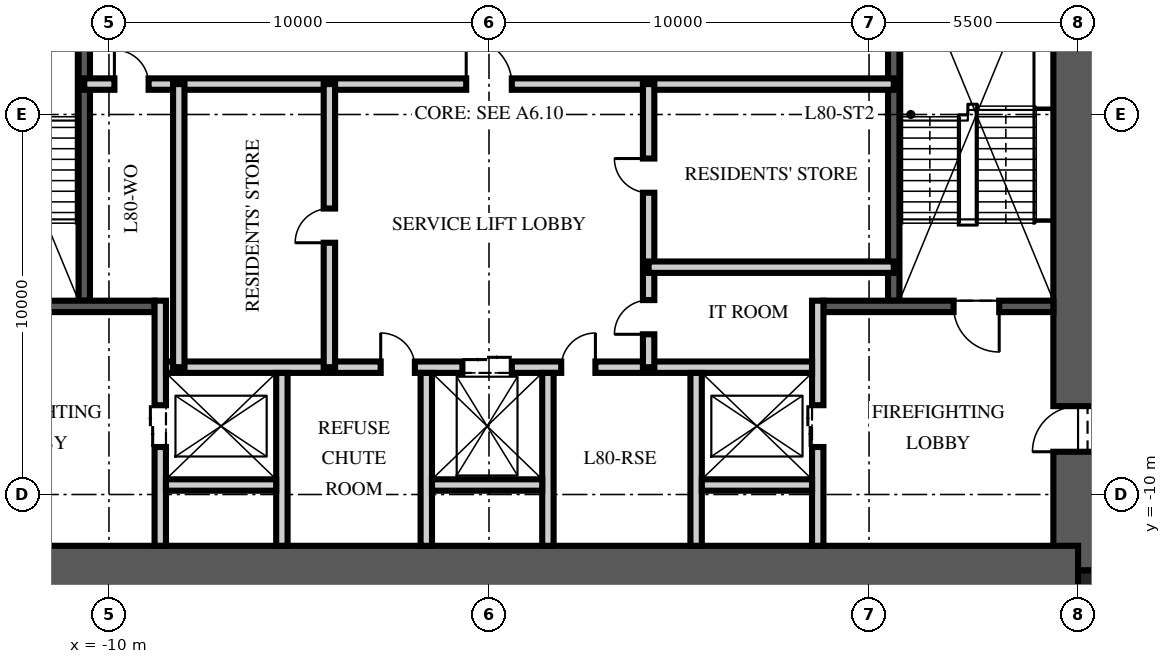
"""IFC4 building model, lengths in metres.
Left out: names, types, materials, properties, quantities, classifications, styles, units other than length and angle.
Written with IfcOpenShell. Run it as: python <this file> out.ifc"""

import sys

from ifc_helpers import new_model, si_unit, direction, frame, frame_2d, origin, origin_2d, place, context, subcontext, project, spatial, rectangle, extrude, element, fill, save


model = new_model("IFC4")
c1 = context("Model", 3, precision=1e-05, world=origin(), true_north=direction((0.0, 1.0)))
c2 = subcontext(c1, "Body", "Model", "MODEL_VIEW")
j1 = project(units=[si_unit("LENGTHUNIT", "METRE"), si_unit("PLANEANGLEUNIT", "RADIAN")], contexts=[c1])
p1 = place(None, origin())
s1 = spatial("IfcSite", under=j1, at=p1, CompositionType="ELEMENT")
p2 = place(p1, origin())
s2 = spatial("IfcBuilding", under=s1, at=p2, CompositionType="ELEMENT")
p3 = place(p2, frame((0.0, 0.0, 319.5)))
s3 = spatial("IfcBuildingStorey", under=s2, at=p3, CompositionType="ELEMENT", Elevation=319.5)
p4 = place(p3, frame((15.5, -12.0, -0.25), z_axis=(0.0, 0.0, 1.0), x_axis=(0.0, 1.0, 0.0)))
e1 = element("IfcWall", 1, at=p4, inside=s3, PredefinedType="SHEAR", context=c2, shape_type="SweptSolid", body=[
    extrude(rectangle(XDim=24.0, YDim=1.3, at=frame_2d((12.0, 0.0))), origin(), (0.0, 0.0, 1.0), 3.75),
])
p5 = place(p4, frame((3.125, 0.0, 0.25)))
e2 = element("IfcOpeningElement", 2, at=p5, cuts=e1, PredefinedType="OPENING", context=c2, shape_type="SweptSolid", body=[
    extrude(rectangle(XDim=1.2, YDim=2.1, at=frame_2d((0.6, 1.05))), frame((0.0, 0.66, 0.0), z_axis=(0.0, -1.0, 0.0), x_axis=(1.0, 0.0, 0.0)), (0.0, 0.0, 1.0), 1.32),
])
p6 = place(p4, frame((19.375, 0.0, 0.25)))
e3 = element("IfcOpeningElement", 3, at=p6, cuts=e1, PredefinedType="OPENING", context=c2, shape_type="SweptSolid", body=[
    extrude(rectangle(XDim=1.8, YDim=2.1, at=frame_2d((0.9, 1.05))), frame((0.0, 0.66, 0.0), z_axis=(0.0, -1.0, 0.0), x_axis=(1.0, 0.0, 0.0)), (0.0, 0.0, 1.0), 1.32),
])
p7 = place(p3, frame((-15.5, -12.0, -0.25), z_axis=(0.0, 0.0, 1.0), x_axis=(1.0, 0.0, 0.0)))
e4 = element("IfcWall", 4, at=p7, inside=s3, PredefinedType="SHEAR", context=c2, shape_type="SweptSolid", body=[
    extrude(rectangle(XDim=31.0, YDim=1.3, at=frame_2d((15.5, 0.0))), origin(), (0.0, 0.0, 1.0), 3.75),
])
p8 = place(p3, frame((15.825, -12.325, -0.25), z_axis=(0.0, 0.0, 1.0), x_axis=(1.0, 0.0, 0.0)))
e5 = element("IfcColumn", 5, at=p8, inside=s3, PredefinedType="COLUMN", context=c2, shape_type="SweptSolid", body=[
    extrude(rectangle(XDim=0.65, YDim=0.65, at=origin_2d()), origin(), (0.0, 0.0, 1.0), 3.75),
])
p9 = place(p3, frame((-10.65, -4.9, 0.0), z_axis=(0.0, 0.0, 1.0), x_axis=(0.0, 1.0, 0.0)))
e6 = element("IfcWall", 6, at=p9, inside=s3, PredefinedType="SOLIDWALL", context=c2, shape_type="SweptSolid", body=[
    extrude(rectangle(XDim=10.1, YDim=0.3, at=frame_2d((5.05, 0.0))), origin(), (0.0, 0.0, 1.0), 3.5),
])
p10 = place(p3, frame((-14.85, -5.05, 0.0), z_axis=(0.0, 0.0, 1.0), x_axis=(1.0, 0.0, 0.0)))
e7 = element("IfcWall", 7, at=p10, inside=s3, PredefinedType="SOLIDWALL", context=c2, shape_type="SweptSolid", body=[
    extrude(rectangle(XDim=6.05, YDim=0.3, at=frame_2d((3.025, 0.0))), origin(), (0.0, 0.0, 1.0), 3.5),
])
p11 = place(p10, frame((1.425, 0.0, 0.0)))
e8 = element("IfcOpeningElement", 8, at=p11, cuts=e7, PredefinedType="OPENING", context=c2, shape_type="SweptSolid", body=[
    extrude(rectangle(XDim=1.2, YDim=2.1, at=frame_2d((0.6, 1.05))), frame((0.0, 0.16, 0.0), z_axis=(0.0, -1.0, 0.0), x_axis=(1.0, 0.0, 0.0)), (0.0, 0.0, 1.0), 0.32),
])
p12 = place(p3, frame((-8.65, -11.35, 0.0), z_axis=(0.0, 0.0, 1.0), x_axis=(0.0, 1.0, 0.0)))
e9 = element("IfcWall", 9, at=p12, inside=s3, PredefinedType="PARTITIONING", context=c2, shape_type="SweptSolid", body=[
    extrude(rectangle(XDim=6.45, YDim=0.3, at=frame_2d((3.225, 0.0))), origin(), (0.0, 0.0, 1.0), 3.5),
])
p13 = place(p12, frame((2.6, 0.0, 0.0)))
e10 = element("IfcOpeningElement", 10, at=p13, cuts=e9, PredefinedType="OPENING", context=c2, shape_type="SweptSolid", body=[
    extrude(rectangle(XDim=1.1, YDim=2.1, at=frame_2d((0.55, 1.05))), frame((0.0, 0.16, 0.0), z_axis=(0.0, -1.0, 0.0), x_axis=(1.0, 0.0, 0.0)), (0.0, 0.0, 1.0), 0.32),
])
p14 = place(p3, frame((10.65, -4.9, 0.0), z_axis=(0.0, 0.0, 1.0), x_axis=(0.0, 1.0, 0.0)))
e11 = element("IfcWall", 11, at=p14, inside=s3, PredefinedType="SOLIDWALL", context=c2, shape_type="SweptSolid", body=[
    extrude(rectangle(XDim=10.1, YDim=0.3, at=frame_2d((5.05, 0.0))), origin(), (0.0, 0.0, 1.0), 3.5),
])
p15 = place(p3, frame((14.85, -5.05, 0.0), z_axis=(0.0, 0.0, 1.0), x_axis=(-1.0, 0.0, 0.0)))
e12 = element("IfcWall", 12, at=p15, inside=s3, PredefinedType="SOLIDWALL", context=c2, shape_type="SweptSolid", body=[
    extrude(rectangle(XDim=6.05, YDim=0.3, at=frame_2d((3.025, 0.0))), origin(), (0.0, 0.0, 1.0), 3.5),
])
p16 = place(p15, frame((1.425, 0.0, 0.0)))
e13 = element("IfcOpeningElement", 13, at=p16, cuts=e12, PredefinedType="OPENING", context=c2, shape_type="SweptSolid", body=[
    extrude(rectangle(XDim=1.2, YDim=2.1, at=frame_2d((0.6, 1.05))), frame((0.0, 0.16, 0.0), z_axis=(0.0, -1.0, 0.0), x_axis=(1.0, 0.0, 0.0)), (0.0, 0.0, 1.0), 0.32),
])
p17 = place(p3, frame((8.65, -11.35, 0.0), z_axis=(0.0, 0.0, 1.0), x_axis=(0.0, 1.0, 0.0)))
e14 = element("IfcWall", 14, at=p17, inside=s3, PredefinedType="PARTITIONING", context=c2, shape_type="SweptSolid", body=[
    extrude(rectangle(XDim=6.45, YDim=0.3, at=frame_2d((3.225, 0.0))), origin(), (0.0, 0.0, 1.0), 3.5),
])
p18 = place(p17, frame((2.6, 0.0, 0.0)))
e15 = element("IfcOpeningElement", 15, at=p18, cuts=e14, PredefinedType="OPENING", context=c2, shape_type="SweptSolid", body=[
    extrude(rectangle(XDim=1.1, YDim=2.1, at=frame_2d((0.55, 1.05))), frame((0.0, 0.16, 0.0), z_axis=(0.0, -1.0, 0.0), x_axis=(1.0, 0.0, 0.0)), (0.0, 0.0, 1.0), 0.32),
])
p19 = place(p3, frame((-8.5, -6.65, 0.0), z_axis=(0.0, 0.0, 1.0), x_axis=(1.0, 0.0, 0.0)))
e16 = element("IfcWall", 16, at=p19, inside=s3, PredefinedType="PARTITIONING", context=c2, shape_type="SweptSolid", body=[
    extrude(rectangle(XDim=17.0, YDim=0.3, at=frame_2d((8.5, 0.0))), origin(), (0.0, 0.0, 1.0), 3.5),
])
p20 = place(p19, frame((7.8, 0.0, 0.0)))
e17 = element("IfcOpeningElement", 17, at=p20, cuts=e16, PredefinedType="OPENING", context=c2, shape_type="SweptSolid", body=[
    extrude(rectangle(XDim=1.3, YDim=2.4, at=frame_2d((0.65, 1.2))), frame((0.0, 0.16, 0.0), z_axis=(0.0, -1.0, 0.0), x_axis=(1.0, 0.0, 0.0)), (0.0, 0.0, 1.0), 0.32),
])
p21 = place(p19, frame((5.65, 0.0, 0.0)))
e18 = element("IfcOpeningElement", 18, at=p21, cuts=e16, PredefinedType="OPENING", context=c2, shape_type="SweptSolid", body=[
    extrude(rectangle(XDim=0.9, YDim=2.1, at=frame_2d((0.45, 1.05))), frame((0.0, 0.16, 0.0), z_axis=(0.0, -1.0, 0.0), x_axis=(1.0, 0.0, 0.0)), (0.0, 0.0, 1.0), 0.32),
])
p22 = place(p19, frame((10.4, 0.0, 0.0)))
e19 = element("IfcOpeningElement", 19, at=p22, cuts=e16, PredefinedType="OPENING", context=c2, shape_type="SweptSolid", body=[
    extrude(rectangle(XDim=0.9, YDim=2.1, at=frame_2d((0.45, 1.05))), frame((0.0, 0.16, 0.0), z_axis=(0.0, -1.0, 0.0), x_axis=(1.0, 0.0, 0.0)), (0.0, 0.0, 1.0), 0.32),
])
for number, where, z_axis, x_axis in (
    (20, (-5.45, -11.35, 0.0), (0.0, 0.0, 1.0), (0.0, 1.0, 0.0)),
    (21, (-1.65, -11.35, 0.0), (0.0, 0.0, 1.0), (0.0, 1.0, 0.0)),
    (22, (1.55, -11.35, 0.0), (0.0, 0.0, 1.0), (0.0, 1.0, 0.0)),
    (23, (5.45, -11.35, 0.0), (0.0, 0.0, 1.0), (0.0, 1.0, 0.0)),
):
    element("IfcWall", number, at=place(p3, frame(where, z_axis=z_axis, x_axis=x_axis)), inside=s3, PredefinedType="PARTITIONING", context=c2, shape_type="SweptSolid", body=[
        extrude(rectangle(XDim=4.55, YDim=0.3, at=frame_2d((2.275, 0.0))), origin(), (0.0, 0.0, 1.0), 3.5),
    ])
for number, where, z_axis, x_axis in (
    (24, (-8.5, -9.75, 0.0), (0.0, 0.0, 1.0), (1.0, 0.0, 0.0)),
    (25, (-1.5, -9.75, 0.0), (0.0, 0.0, 1.0), (1.0, 0.0, 0.0)),
    (26, (5.6, -9.75, 0.0), (0.0, 0.0, 1.0), (1.0, 0.0, 0.0)),
):
    element("IfcWall", number, at=place(p3, frame(where, z_axis=z_axis, x_axis=x_axis)), inside=s3, PredefinedType="PARTITIONING", context=c2, shape_type="SweptSolid", body=[
        extrude(rectangle(XDim=2.9, YDim=0.3, at=frame_2d((1.45, 0.0))), origin(), (0.0, 0.0, 1.0), 3.5),
    ])
p23 = place(p3, frame((-10.65, 0.8, 0.0), z_axis=(0.0, 0.0, 1.0), x_axis=(1.0, 0.0, 0.0)))
e27 = element("IfcWall", 27, at=p23, inside=s3, PredefinedType="PARTITIONING", context=c2, shape_type="SweptSolid", body=[
    extrude(rectangle(XDim=21.3, YDim=0.3, at=frame_2d((10.65, 0.0))), origin(), (0.0, 0.0, 1.0), 3.5),
])
p24 = place(p23, frame((10.05, 0.0, 0.0)))
e28 = element("IfcOpeningElement", 28, at=p24, cuts=e27, PredefinedType="OPENING", context=c2, shape_type="SweptSolid", body=[
    extrude(rectangle(XDim=1.2, YDim=2.1, at=frame_2d((0.6, 1.05))), frame((0.0, 0.16, 0.0), z_axis=(0.0, -1.0, 0.0), x_axis=(1.0, 0.0, 0.0)), (0.0, 0.0, 1.0), 0.32),
])
p25 = place(p23, frame((0.793, 0.0, 0.0)))
e29 = element("IfcOpeningElement", 29, at=p25, cuts=e27, PredefinedType="OPENING", context=c2, shape_type="SweptSolid", body=[
    extrude(rectangle(XDim=0.9, YDim=2.1, at=frame_2d((0.45, 1.05))), frame((0.0, 0.16, 0.0), z_axis=(0.0, -1.0, 0.0), x_axis=(1.0, 0.0, 0.0)), (0.0, 0.0, 1.0), 0.32),
])
p26 = place(p3, frame((-4.2, -6.65, 0.0), z_axis=(0.0, 0.0, 1.0), x_axis=(0.0, 1.0, 0.0)))
e30 = element("IfcWall", 30, at=p26, inside=s3, PredefinedType="PARTITIONING", context=c2, shape_type="SweptSolid", body=[
    extrude(rectangle(XDim=7.45, YDim=0.3, at=frame_2d((3.725, 0.0))), origin(), (0.0, 0.0, 1.0), 3.5),
])
p27 = place(p26, frame((3.275, 0.0, 0.0)))
e31 = element("IfcOpeningElement", 31, at=p27, cuts=e30, PredefinedType="OPENING", context=c2, shape_type="SweptSolid", body=[
    extrude(rectangle(XDim=0.9, YDim=2.1, at=frame_2d((0.45, 1.05))), frame((0.0, 0.16, 0.0), z_axis=(0.0, -1.0, 0.0), x_axis=(1.0, 0.0, 0.0)), (0.0, 0.0, 1.0), 0.32),
])
p28 = place(p3, frame((4.2, -6.65, 0.0), z_axis=(0.0, 0.0, 1.0), x_axis=(0.0, 1.0, 0.0)))
e32 = element("IfcWall", 32, at=p28, inside=s3, PredefinedType="PARTITIONING", context=c2, shape_type="SweptSolid", body=[
    extrude(rectangle(XDim=7.45, YDim=0.3, at=frame_2d((3.725, 0.0))), origin(), (0.0, 0.0, 1.0), 3.5),
])
p29 = place(p28, frame((0.866, 0.0, 0.0)))
e33 = element("IfcOpeningElement", 33, at=p29, cuts=e32, PredefinedType="OPENING", context=c2, shape_type="SweptSolid", body=[
    extrude(rectangle(XDim=0.9, YDim=2.1, at=frame_2d((0.45, 1.05))), frame((0.0, 0.16, 0.0), z_axis=(0.0, -1.0, 0.0), x_axis=(1.0, 0.0, 0.0)), (0.0, 0.0, 1.0), 0.32),
])
p30 = place(p28, frame((4.591, 0.0, 0.0)))
e34 = element("IfcOpeningElement", 34, at=p30, cuts=e32, PredefinedType="OPENING", context=c2, shape_type="SweptSolid", body=[
    extrude(rectangle(XDim=0.9, YDim=2.1, at=frame_2d((0.45, 1.05))), frame((0.0, 0.16, 0.0), z_axis=(0.0, -1.0, 0.0), x_axis=(1.0, 0.0, 0.0)), (0.0, 0.0, 1.0), 0.32),
])
p31 = place(p3, frame((-8.163, -6.65, 0.0), z_axis=(0.0, 0.0, 1.0), x_axis=(0.0, 1.0, 0.0)))
e35 = element("IfcWall", 35, at=p31, inside=s3, PredefinedType="PARTITIONING", context=c2, shape_type="SweptSolid", body=[
    extrude(rectangle(XDim=7.45, YDim=0.3, at=frame_2d((3.725, 0.0))), origin(), (0.0, 0.0, 1.0), 3.5),
])
p32 = place(p3, frame((10.65, -4.018, 0.0), z_axis=(0.0, 0.0, 1.0), x_axis=(-1.0, 0.0, 0.0)))
e36 = element("IfcWall", 36, at=p32, inside=s3, PredefinedType="PARTITIONING", context=c2, shape_type="SweptSolid", body=[
    extrude(rectangle(XDim=6.45, YDim=0.3, at=frame_2d((3.225, 0.0))), origin(), (0.0, 0.0, 1.0), 3.5),
])
p33 = place(p16, origin())
e37 = element("IfcDoor", 37, at=p33, inside=s3, OperationType="SINGLE_SWING_LEFT", PredefinedType="DOOR", context=c2, shape_type="SweptSolid", body=[
    extrude(rectangle(XDim=1.2, YDim=2.1, at=frame_2d((0.6, 1.05))), frame((0.0, 0.025, 0.0), z_axis=(0.0, -1.0, 0.0), x_axis=(1.0, 0.0, 0.0)), (0.0, 0.0, 1.0), 0.05),
])
fill(e13, e37)
p34 = place(p5, origin())
e38 = element("IfcDoor", 38, at=p34, inside=s3, OperationType="SINGLE_SWING_LEFT", PredefinedType="DOOR", context=c2, shape_type="SweptSolid", body=[
    extrude(rectangle(XDim=1.2, YDim=2.1, at=frame_2d((0.6, 1.05))), frame((0.0, 0.025, 0.0), z_axis=(0.0, -1.0, 0.0), x_axis=(1.0, 0.0, 0.0)), (0.0, 0.0, 1.0), 0.05),
])
fill(e2, e38)
p35 = place(p13, origin())
e39 = element("IfcDoor", 39, at=p35, inside=s3, OperationType="DOUBLE_DOOR_SLIDING", PredefinedType="DOOR", context=c2, shape_type="SweptSolid", body=[
    extrude(rectangle(XDim=1.1, YDim=2.1, at=frame_2d((0.55, 1.05))), frame((0.0, 0.025, 0.0), z_axis=(0.0, -1.0, 0.0), x_axis=(1.0, 0.0, 0.0)), (0.0, 0.0, 1.0), 0.05),
])
fill(e10, e39)
p36 = place(p18, origin())
e40 = element("IfcDoor", 40, at=p36, inside=s3, OperationType="DOUBLE_DOOR_SLIDING", PredefinedType="DOOR", context=c2, shape_type="SweptSolid", body=[
    extrude(rectangle(XDim=1.1, YDim=2.1, at=frame_2d((0.55, 1.05))), frame((0.0, 0.025, 0.0), z_axis=(0.0, -1.0, 0.0), x_axis=(1.0, 0.0, 0.0)), (0.0, 0.0, 1.0), 0.05),
])
fill(e15, e40)
p37 = place(p20, origin())
e41 = element("IfcDoor", 41, at=p37, inside=s3, OperationType="DOUBLE_DOOR_SLIDING", PredefinedType="DOOR", context=c2, shape_type="SweptSolid", body=[
    extrude(rectangle(XDim=1.3, YDim=2.4, at=frame_2d((0.65, 1.2))), frame((0.0, 0.025, 0.0), z_axis=(0.0, -1.0, 0.0), x_axis=(1.0, 0.0, 0.0)), (0.0, 0.0, 1.0), 0.05),
])
fill(e17, e41)
p38 = place(p24, origin())
e42 = element("IfcDoor", 42, at=p38, inside=s3, OperationType="SINGLE_SWING_LEFT", PredefinedType="DOOR", context=c2, shape_type="SweptSolid", body=[
    extrude(rectangle(XDim=1.2, YDim=2.1, at=frame_2d((0.6, 1.05))), frame((0.0, 0.025, 0.0), z_axis=(0.0, -1.0, 0.0), x_axis=(1.0, 0.0, 0.0)), (0.0, 0.0, 1.0), 0.05),
])
fill(e28, e42)
p39 = place(p21, origin())
e43 = element("IfcDoor", 43, at=p39, inside=s3, OperationType="SINGLE_SWING_LEFT", PredefinedType="DOOR", context=c2, shape_type="SweptSolid", body=[
    extrude(rectangle(XDim=0.9, YDim=2.1, at=frame_2d((0.45, 1.05))), frame((0.0, 0.025, 0.0), z_axis=(0.0, -1.0, 0.0), x_axis=(1.0, 0.0, 0.0)), (0.0, 0.0, 1.0), 0.05),
])
fill(e18, e43)
p40 = place(p22, origin())
e44 = element("IfcDoor", 44, at=p40, inside=s3, OperationType="SINGLE_SWING_RIGHT", PredefinedType="DOOR", context=c2, shape_type="SweptSolid", body=[
    extrude(rectangle(XDim=0.9, YDim=2.1, at=frame_2d((0.45, 1.05))), frame((0.0, 0.025, 0.0), z_axis=(0.0, -1.0, 0.0), x_axis=(1.0, 0.0, 0.0)), (0.0, 0.0, 1.0), 0.05),
])
fill(e19, e44)
p41 = place(p27, origin())
e45 = element("IfcDoor", 45, at=p41, inside=s3, OperationType="SINGLE_SWING_LEFT", PredefinedType="DOOR", context=c2, shape_type="SweptSolid", body=[
    extrude(rectangle(XDim=0.9, YDim=2.1, at=frame_2d((0.45, 1.05))), frame((0.0, 0.025, 0.0), z_axis=(0.0, -1.0, 0.0), x_axis=(1.0, 0.0, 0.0)), (0.0, 0.0, 1.0), 0.05),
])
fill(e31, e45)
p42 = place(p25, origin())
e46 = element("IfcDoor", 46, at=p42, inside=s3, OperationType="SINGLE_SWING_LEFT", PredefinedType="DOOR", context=c2, shape_type="SweptSolid", body=[
    extrude(rectangle(XDim=0.9, YDim=2.1, at=frame_2d((0.45, 1.05))), frame((0.0, 0.025, 0.0), z_axis=(0.0, -1.0, 0.0), x_axis=(1.0, 0.0, 0.0)), (0.0, 0.0, 1.0), 0.05),
])
fill(e29, e46)
p43 = place(p29, origin())
e47 = element("IfcDoor", 47, at=p43, inside=s3, OperationType="SINGLE_SWING_LEFT", PredefinedType="DOOR", context=c2, shape_type="SweptSolid", body=[
    extrude(rectangle(XDim=0.9, YDim=2.1, at=frame_2d((0.45, 1.05))), frame((0.0, 0.025, 0.0), z_axis=(0.0, -1.0, 0.0), x_axis=(1.0, 0.0, 0.0)), (0.0, 0.0, 1.0), 0.05),
])
fill(e33, e47)
p44 = place(p30, origin())
e48 = element("IfcDoor", 48, at=p44, inside=s3, OperationType="SINGLE_SWING_RIGHT", PredefinedType="DOOR", context=c2, shape_type="SweptSolid", body=[
    extrude(rectangle(XDim=0.9, YDim=2.1, at=frame_2d((0.45, 1.05))), frame((0.0, 0.025, 0.0), z_axis=(0.0, -1.0, 0.0), x_axis=(1.0, 0.0, 0.0)), (0.0, 0.0, 1.0), 0.05),
])
fill(e34, e48)
save(model, sys.argv[1])
